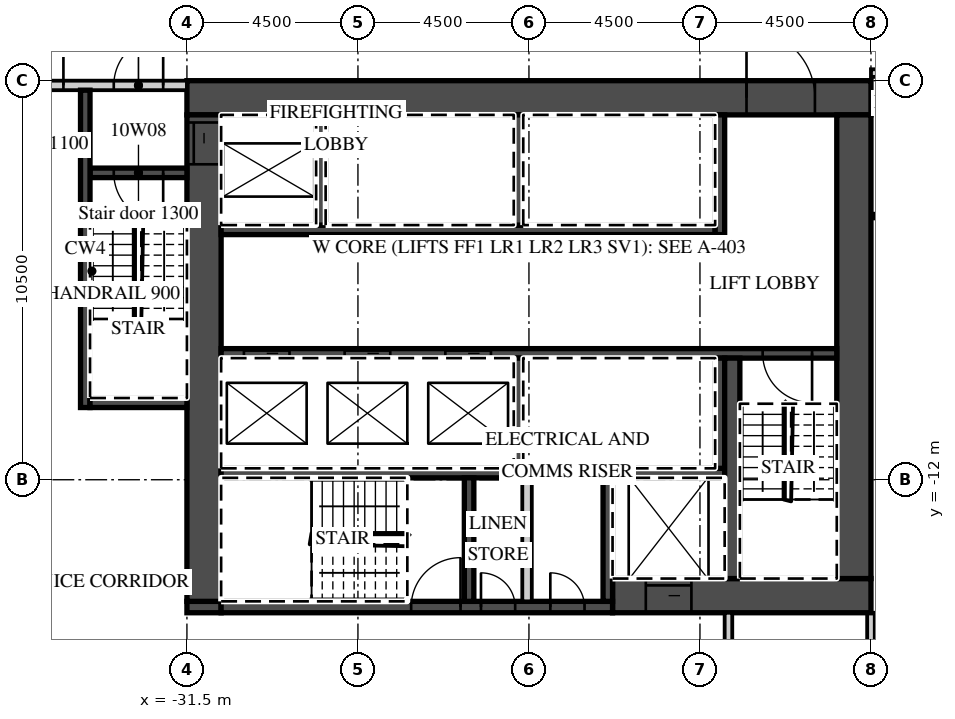
"""IFC4 building model, lengths in metres.
Left out: names, types, materials, properties, quantities, classifications, styles, units other than length and angle.
Written with IfcOpenShell. Run it as: python <this file> out.ifc"""

import sys

from ifc_helpers import new_model, si_unit, direction, frame, frame_2d, origin, place, context, subcontext, project, spatial, rectangle, extrude, element, fill, save


model = new_model("IFC4")
c1 = context("Model", 3, precision=1e-05, world=origin(), true_north=direction((0.0, 1.0)))
c2 = subcontext(c1, "Body", "Model", "MODEL_VIEW")
j1 = project(units=[si_unit("LENGTHUNIT", "METRE"), si_unit("PLANEANGLEUNIT", "RADIAN")], contexts=[c1])
p1 = place(None, origin())
s1 = spatial("IfcSite", under=j1, at=p1, CompositionType="ELEMENT")
p2 = place(p1, origin())
s2 = spatial("IfcBuilding", under=s1, at=p2, CompositionType="ELEMENT")
p3 = place(p2, frame((0.0, 0.0, 63.3)))
s3 = spatial("IfcBuildingStorey", under=s2, at=p3, CompositionType="ELEMENT", Elevation=63.3)
p4 = place(p3, frame((-13.5, -21.55, 0.0), z_axis=(0.0, 0.0, 1.0), x_axis=(0.0, 1.0, 0.0)))
e1 = element("IfcWall", 1, at=p4, inside=s3, PredefinedType="PARTITIONING", context=c2, shape_type="SweptSolid", body=[
    extrude(rectangle(XDim=6.05, YDim=0.2, at=frame_2d((3.025, 0.0))), origin(), (0.0, 0.0, 1.0), 3.02),
])
p5 = place(p3, frame((-13.5, -1.3, 0.0), z_axis=(0.0, 0.0, 1.0), x_axis=(1.0, 0.0, 0.0)))
e2 = element("IfcWall", 2, at=p5, inside=s3, PredefinedType="PARTITIONING", context=c2, shape_type="SweptSolid", body=[
    extrude(rectangle(XDim=58.05, YDim=0.2, at=frame_2d((29.025, 0.0))), origin(), (0.0, 0.0, 1.0), 3.02),
])
p6 = place(p5, frame((2.925, 0.0, 0.0)))
e3 = element("IfcOpeningElement", 3, at=p6, cuts=e2, PredefinedType="OPENING", context=c2, shape_type="SweptSolid", body=[
    extrude(rectangle(XDim=1.0, YDim=2.1, at=frame_2d((0.5, 1.05))), frame((0.0, 0.11, 0.0), z_axis=(0.0, -1.0, 0.0), x_axis=(1.0, 0.0, 0.0)), (0.0, 0.0, 1.0), 0.22),
])
p7 = place(p5, frame((9.863, 0.0, 0.0)))
e4 = element("IfcOpeningElement", 4, at=p7, cuts=e2, PredefinedType="OPENING", context=c2, shape_type="SweptSolid", body=[
    extrude(rectangle(XDim=1.2, YDim=2.1, at=frame_2d((0.6, 1.05))), frame((0.0, 0.11, 0.0), z_axis=(0.0, -1.0, 0.0), x_axis=(1.0, 0.0, 0.0)), (0.0, 0.0, 1.0), 0.22),
])
p8 = place(p5, frame((16.45, 0.0, 0.0)))
e5 = element("IfcOpeningElement", 5, at=p8, cuts=e2, PredefinedType="OPENING", context=c2, shape_type="SweptSolid", body=[
    extrude(rectangle(XDim=1.0, YDim=2.1, at=frame_2d((0.5, 1.05))), frame((0.0, 0.11, 0.0), z_axis=(0.0, -1.0, 0.0), x_axis=(1.0, 0.0, 0.0)), (0.0, 0.0, 1.0), 0.22),
])
p9 = place(p5, frame((18.55, 0.0, 0.0)))
e6 = element("IfcOpeningElement", 6, at=p9, cuts=e2, PredefinedType="OPENING", context=c2, shape_type="SweptSolid", body=[
    extrude(rectangle(XDim=1.0, YDim=2.1, at=frame_2d((0.5, 1.05))), frame((0.0, 0.11, 0.0), z_axis=(0.0, -1.0, 0.0), x_axis=(1.0, 0.0, 0.0)), (0.0, 0.0, 1.0), 0.22),
])
p10 = place(p5, frame((24.938, 0.0, 0.0)))
e7 = element("IfcOpeningElement", 7, at=p10, cuts=e2, PredefinedType="OPENING", context=c2, shape_type="SweptSolid", body=[
    extrude(rectangle(XDim=1.2, YDim=2.1, at=frame_2d((0.6, 1.05))), frame((0.0, 0.11, 0.0), z_axis=(0.0, -1.0, 0.0), x_axis=(1.0, 0.0, 0.0)), (0.0, 0.0, 1.0), 0.22),
])
p11 = place(p5, frame((33.938, 0.0, 0.0)))
e8 = element("IfcOpeningElement", 8, at=p11, cuts=e2, PredefinedType="OPENING", context=c2, shape_type="SweptSolid", body=[
    extrude(rectangle(XDim=1.2, YDim=2.1, at=frame_2d((0.6, 1.05))), frame((0.0, 0.11, 0.0), z_axis=(0.0, -1.0, 0.0), x_axis=(1.0, 0.0, 0.0)), (0.0, 0.0, 1.0), 0.22),
])
p12 = place(p5, frame((42.938, 0.0, 0.0)))
e9 = element("IfcOpeningElement", 9, at=p12, cuts=e2, PredefinedType="OPENING", context=c2, shape_type="SweptSolid", body=[
    extrude(rectangle(XDim=1.2, YDim=2.1, at=frame_2d((0.6, 1.05))), frame((0.0, 0.11, 0.0), z_axis=(0.0, -1.0, 0.0), x_axis=(1.0, 0.0, 0.0)), (0.0, 0.0, 1.0), 0.22),
])
p13 = place(p5, frame((52.425, 0.0, 0.0)))
e10 = element("IfcOpeningElement", 10, at=p13, cuts=e2, PredefinedType="OPENING", context=c2, shape_type="SweptSolid", body=[
    extrude(rectangle(XDim=1.0, YDim=2.1, at=frame_2d((0.5, 1.05))), frame((0.0, 0.11, 0.0), z_axis=(0.0, -1.0, 0.0), x_axis=(1.0, 0.0, 0.0)), (0.0, 0.0, 1.0), 0.22),
])
p14 = place(p5, frame((56.525, 0.0, 0.0)))
e11 = element("IfcOpeningElement", 11, at=p14, cuts=e2, PredefinedType="OPENING", context=c2, shape_type="SweptSolid", body=[
    extrude(rectangle(XDim=1.0, YDim=2.1, at=frame_2d((0.5, 1.05))), frame((0.0, 0.11, 0.0), z_axis=(0.0, -1.0, 0.0), x_axis=(1.0, 0.0, 0.0)), (0.0, 0.0, 1.0), 0.22),
])
p15 = place(p3, frame((-31.5, -1.95, 0.0), z_axis=(0.0, 0.0, 1.0), x_axis=(1.0, 0.0, 0.0)))
e12 = element("IfcWall", 12, at=p15, inside=s3, PredefinedType="SHEAR", context=c2, shape_type="SweptSolid", body=[
    extrude(rectangle(XDim=18.0, YDim=0.9, at=frame_2d((9.0, 0.0))), origin(), (0.0, 0.0, 1.0), 3.02),
])
p16 = place(p15, frame((14.725, 0.0, 0.0)))
e13 = element("IfcOpeningElement", 13, at=p16, cuts=e12, PredefinedType="OPENING", context=c2, shape_type="SweptSolid", body=[
    extrude(rectangle(XDim=1.8, YDim=2.1, at=frame_2d((0.9, 1.05))), frame((0.0, 0.46, 0.0), z_axis=(0.0, -1.0, 0.0), x_axis=(1.0, 0.0, 0.0)), (0.0, 0.0, 1.0), 0.92),
])
p17 = place(p3, frame((-20.3, -15.05, 0.0), z_axis=(0.0, 0.0, 1.0), x_axis=(1.0, 0.0, 0.0)))
e14 = element("IfcWall", 14, at=p17, inside=s3, PredefinedType="SHEAR", context=c2, shape_type="SweptSolid", body=[
    extrude(rectangle(XDim=6.8, YDim=0.9, at=frame_2d((3.4, 0.0))), origin(), (0.0, 0.0, 1.0), 3.02),
])
p18 = place(p17, frame((0.875, 0.0, 0.0)))
e15 = element("IfcOpeningElement", 15, at=p18, cuts=e14, PredefinedType="OPENING", context=c2, shape_type="SweptSolid", body=[
    extrude(rectangle(XDim=1.2, YDim=2.1, at=frame_2d((0.6, 1.05))), frame((0.0, 0.46, 0.0), z_axis=(0.0, -1.0, 0.0), x_axis=(1.0, 0.0, 0.0)), (0.0, 0.0, 1.0), 0.92),
])
p19 = place(p3, frame((-31.5, -15.35, 0.0), z_axis=(0.0, 0.0, 1.0), x_axis=(1.0, 0.0, 0.0)))
e16 = element("IfcWall", 16, at=p19, inside=s3, PredefinedType="SHEAR", context=c2, shape_type="SweptSolid", body=[
    extrude(rectangle(XDim=0.9, YDim=0.3, at=frame_2d((0.45, 0.0))), origin(), (0.0, 0.0, 1.0), 3.02),
])
p20 = place(p3, frame((-30.6, -15.35, 0.0), z_axis=(0.0, 0.0, 1.0), x_axis=(1.0, 0.0, 0.0)))
e17 = element("IfcWall", 17, at=p20, inside=s3, PredefinedType="SHEAR", context=c2, shape_type="SweptSolid", body=[
    extrude(rectangle(XDim=10.3, YDim=0.3, at=frame_2d((5.15, 0.0))), origin(), (0.0, 0.0, 1.0), 3.02),
])
p21 = place(p20, frame((5.0, 0.0, 0.0)))
e18 = element("IfcOpeningElement", 18, at=p21, cuts=e17, PredefinedType="OPENING", context=c2, shape_type="SweptSolid", body=[
    extrude(rectangle(XDim=1.3, YDim=2.1, at=frame_2d((0.65, 1.05))), frame((0.0, 0.16, 0.0), z_axis=(0.0, -1.0, 0.0), x_axis=(1.0, 0.0, 0.0)), (0.0, 0.0, 1.0), 0.32),
])
p22 = place(p20, frame((6.837, 0.0, 0.0)))
e19 = element("IfcOpeningElement", 19, at=p22, cuts=e17, PredefinedType="OPENING", context=c2, shape_type="SweptSolid", body=[
    extrude(rectangle(XDim=0.9, YDim=2.1, at=frame_2d((0.45, 1.05))), frame((0.0, 0.16, 0.0), z_axis=(0.0, -1.0, 0.0), x_axis=(1.0, 0.0, 0.0)), (0.0, 0.0, 1.0), 0.32),
])
p23 = place(p20, frame((8.663, 0.0, 0.0)))
e20 = element("IfcOpeningElement", 20, at=p23, cuts=e17, PredefinedType="OPENING", context=c2, shape_type="SweptSolid", body=[
    extrude(rectangle(XDim=0.9, YDim=2.1, at=frame_2d((0.45, 1.05))), frame((0.0, 0.16, 0.0), z_axis=(0.0, -1.0, 0.0), x_axis=(1.0, 0.0, 0.0)), (0.0, 0.0, 1.0), 0.32),
])
p24 = place(p3, frame((-31.05, -15.2, 0.0), z_axis=(0.0, 0.0, 1.0), x_axis=(0.0, 1.0, 0.0)))
e21 = element("IfcWall", 21, at=p24, inside=s3, PredefinedType="SHEAR", context=c2, shape_type="SweptSolid", body=[
    extrude(rectangle(XDim=12.8, YDim=0.9, at=frame_2d((6.4, 0.0))), origin(), (0.0, 0.0, 1.0), 3.02),
])
p25 = place(p24, frame((11.5, 0.0, 0.0)))
e22 = element("IfcOpeningElement", 22, at=p25, cuts=e21, PredefinedType="OPENING", context=c2, shape_type="SweptSolid", body=[
    extrude(rectangle(XDim=1.1, YDim=2.1, at=frame_2d((0.55, 1.05))), frame((0.0, 0.46, 0.0), z_axis=(0.0, -1.0, 0.0), x_axis=(1.0, 0.0, 0.0)), (0.0, 0.0, 1.0), 0.92),
])
p26 = place(p3, frame((-13.95, -14.6, 0.0), z_axis=(0.0, 0.0, 1.0), x_axis=(0.0, 1.0, 0.0)))
e23 = element("IfcWall", 23, at=p26, inside=s3, PredefinedType="SHEAR", context=c2, shape_type="SweptSolid", body=[
    extrude(rectangle(XDim=12.2, YDim=0.9, at=frame_2d((6.1, 0.0))), origin(), (0.0, 0.0, 1.0), 3.02),
])
p27 = place(p3, frame((-30.6, -5.425, 0.0), z_axis=(0.0, 0.0, 1.0), x_axis=(1.0, 0.0, 0.0)))
e24 = element("IfcWall", 24, at=p27, inside=s3, PredefinedType="SHEAR", context=c2, shape_type="SweptSolid", body=[
    extrude(rectangle(XDim=13.0, YDim=0.25, at=frame_2d((6.5, 0.0))), origin(), (0.0, 0.0, 1.0), 3.02),
])
p28 = place(p3, frame((-17.475, -5.55, 0.0), z_axis=(0.0, 0.0, 1.0), x_axis=(0.0, 1.0, 0.0)))
e25 = element("IfcWall", 25, at=p28, inside=s3, PredefinedType="SHEAR", context=c2, shape_type="SweptSolid", body=[
    extrude(rectangle(XDim=3.15, YDim=0.25, at=frame_2d((1.575, 0.0))), origin(), (0.0, 0.0, 1.0), 3.02),
])
for number, where, z_axis, x_axis in (
    (26, (-27.975, -5.3, 0.0), (0.0, 0.0, 1.0), (0.0, 1.0, 0.0)),
    (27, (-22.775, -5.3, 0.0), (0.0, 0.0, 1.0), (0.0, 1.0, 0.0)),
):
    element("IfcWall", number, at=place(p3, frame(where, z_axis=z_axis, x_axis=x_axis)), inside=s3, PredefinedType="SHEAR", context=c2, shape_type="SweptSolid", body=[
        extrude(rectangle(XDim=2.9, YDim=0.25, at=frame_2d((1.45, 0.0))), origin(), (0.0, 0.0, 1.0), 3.02),
    ])
p29 = place(p3, frame((-30.6, -8.675, 0.0), z_axis=(0.0, 0.0, 1.0), x_axis=(1.0, 0.0, 0.0)))
e28 = element("IfcWall", 28, at=p29, inside=s3, PredefinedType="SHEAR", context=c2, shape_type="SweptSolid", body=[
    extrude(rectangle(XDim=16.2, YDim=0.25, at=frame_2d((8.1, 0.0))), origin(), (0.0, 0.0, 1.0), 3.02),
])
p30 = place(p29, frame((0.6, 0.0, 0.0)))
e29 = element("IfcOpeningElement", 29, at=p30, cuts=e28, PredefinedType="OPENING", context=c2, shape_type="SweptSolid", body=[
    extrude(rectangle(XDim=1.2, YDim=2.1, at=frame_2d((0.6, 1.05))), frame((0.0, 0.135, 0.0), z_axis=(0.0, -1.0, 0.0), x_axis=(1.0, 0.0, 0.0)), (0.0, 0.0, 1.0), 0.27),
])
p31 = place(p29, frame((3.25, 0.0, 0.0)))
e30 = element("IfcOpeningElement", 30, at=p31, cuts=e28, PredefinedType="OPENING", context=c2, shape_type="SweptSolid", body=[
    extrude(rectangle(XDim=1.2, YDim=2.1, at=frame_2d((0.6, 1.05))), frame((0.0, 0.135, 0.0), z_axis=(0.0, -1.0, 0.0), x_axis=(1.0, 0.0, 0.0)), (0.0, 0.0, 1.0), 0.27),
])
p32 = place(p29, frame((5.9, 0.0, 0.0)))
e31 = element("IfcOpeningElement", 31, at=p32, cuts=e28, PredefinedType="OPENING", context=c2, shape_type="SweptSolid", body=[
    extrude(rectangle(XDim=1.2, YDim=2.1, at=frame_2d((0.6, 1.05))), frame((0.0, 0.135, 0.0), z_axis=(0.0, -1.0, 0.0), x_axis=(1.0, 0.0, 0.0)), (0.0, 0.0, 1.0), 0.27),
])
p33 = place(p29, frame((14.25, 0.0, 0.0)))
e32 = element("IfcOpeningElement", 32, at=p33, cuts=e28, PredefinedType="OPENING", context=c2, shape_type="SweptSolid", body=[
    extrude(rectangle(XDim=1.3, YDim=2.1, at=frame_2d((0.65, 1.05))), frame((0.0, 0.135, 0.0), z_axis=(0.0, -1.0, 0.0), x_axis=(1.0, 0.0, 0.0)), (0.0, 0.0, 1.0), 0.27),
])
p34 = place(p3, frame((-30.6, -11.825, 0.0), z_axis=(0.0, 0.0, 1.0), x_axis=(1.0, 0.0, 0.0)))
e33 = element("IfcWall", 33, at=p34, inside=s3, PredefinedType="SHEAR", context=c2, shape_type="SweptSolid", body=[
    extrude(rectangle(XDim=13.25, YDim=0.25, at=frame_2d((6.625, 0.0))), origin(), (0.0, 0.0, 1.0), 3.02),
])
for number, where, z_axis, x_axis in (
    (34, (-17.475, -11.7, 0.0), (0.0, 0.0, 1.0), (0.0, 1.0, 0.0)),
    (35, (-22.775, -11.7, 0.0), (0.0, 0.0, 1.0), (0.0, 1.0, 0.0)),
):
    element("IfcWall", number, at=place(p3, frame(where, z_axis=z_axis, x_axis=x_axis)), inside=s3, PredefinedType="SHEAR", context=c2, shape_type="SweptSolid", body=[
        extrude(rectangle(XDim=2.9, YDim=0.25, at=frame_2d((1.45, 0.0))), origin(), (0.0, 0.0, 1.0), 3.02),
    ])
p35 = place(p3, frame((-17.15, -14.6, 0.0), z_axis=(0.0, 0.0, 1.0), x_axis=(0.0, 1.0, 0.0)))
e36 = element("IfcWall", 36, at=p35, inside=s3, PredefinedType="SHEAR", context=c2, shape_type="SweptSolid", body=[
    extrude(rectangle(XDim=5.8, YDim=0.4, at=frame_2d((2.9, 0.0))), origin(), (0.0, 0.0, 1.0), 3.02),
])
for number, where, z_axis, x_axis in (
    (37, (-20.425, -15.2, 0.0), (0.0, 0.0, 1.0), (0.0, 1.0, 0.0)),
    (38, (-24.075, -15.2, 0.0), (0.0, 0.0, 1.0), (0.0, 1.0, 0.0)),
):
    element("IfcWall", number, at=place(p3, frame(where, z_axis=z_axis, x_axis=x_axis)), inside=s3, PredefinedType="SHEAR", context=c2, shape_type="SweptSolid", body=[
        extrude(rectangle(XDim=3.25, YDim=0.25, at=frame_2d((1.625, 0.0))), origin(), (0.0, 0.0, 1.0), 3.02),
    ])
p36 = place(p3, frame((-22.55, -15.2, 0.0), z_axis=(0.0, 0.0, 1.0), x_axis=(0.0, 1.0, 0.0)))
e39 = element("IfcWall", 39, at=p36, inside=s3, PredefinedType="PARTITIONING", context=c2, shape_type="SweptSolid", body=[
    extrude(rectangle(XDim=3.25, YDim=0.25, at=frame_2d((1.625, 0.0))), origin(), (0.0, 0.0, 1.0), 3.02),
])
p37 = place(p3, frame((-44.55, -1.625, 0.0), z_axis=(0.0, 0.0, 1.0), x_axis=(1.0, 0.0, 0.0)))
e40 = element("IfcWall", 40, at=p37, inside=s3, PredefinedType="PARTITIONING", context=c2, shape_type="SweptSolid", body=[
    extrude(rectangle(XDim=13.05, YDim=0.25, at=frame_2d((6.525, 0.0))), origin(), (0.0, 0.0, 1.0), 3.02),
])
p38 = place(p37, frame((11.125, 0.0, 0.0)))
e41 = element("IfcOpeningElement", 41, at=p38, cuts=e40, PredefinedType="OPENING", context=c2, shape_type="SweptSolid", body=[
    extrude(rectangle(XDim=1.3, YDim=2.1, at=frame_2d((0.65, 1.05))), frame((0.0, 0.135, 0.0), z_axis=(0.0, -1.0, 0.0), x_axis=(1.0, 0.0, 0.0)), (0.0, 0.0, 1.0), 0.27),
])
p39 = place(p37, frame((8.7, 0.0, 0.0)))
e42 = element("IfcOpeningElement", 42, at=p39, cuts=e40, PredefinedType="OPENING", context=c2, shape_type="SweptSolid", body=[
    extrude(rectangle(XDim=1.1, YDim=2.1, at=frame_2d((0.55, 1.05))), frame((0.0, 0.135, 0.0), z_axis=(0.0, -1.0, 0.0), x_axis=(1.0, 0.0, 0.0)), (0.0, 0.0, 1.0), 0.27),
])
p40 = place(p3, frame((-34.05, -3.925, 0.0), z_axis=(0.0, 0.0, 1.0), x_axis=(1.0, 0.0, 0.0)))
e43 = element("IfcWall", 43, at=p40, inside=s3, PredefinedType="SHEAR", context=c2, shape_type="SweptSolid", body=[
    extrude(rectangle(XDim=2.55, YDim=0.25, at=frame_2d((1.275, 0.0))), origin(), (0.0, 0.0, 1.0), 3.02),
])
p41 = place(p40, frame((0.625, 0.0, 0.0)))
e44 = element("IfcOpeningElement", 44, at=p41, cuts=e43, PredefinedType="OPENING", context=c2, shape_type="SweptSolid", body=[
    extrude(rectangle(XDim=1.3, YDim=2.1, at=frame_2d((0.65, 1.05))), frame((0.0, 0.135, 0.0), z_axis=(0.0, -1.0, 0.0), x_axis=(1.0, 0.0, 0.0)), (0.0, 0.0, 1.0), 0.27),
])
p42 = place(p3, frame((-34.175, -10.1, 0.0), z_axis=(0.0, 0.0, 1.0), x_axis=(0.0, 1.0, 0.0)))
e45 = element("IfcWall", 45, at=p42, inside=s3, PredefinedType="SHEAR", context=c2, shape_type="SweptSolid", body=[
    extrude(rectangle(XDim=8.35, YDim=0.25, at=frame_2d((4.175, 0.0))), origin(), (0.0, 0.0, 1.0), 3.02),
])
p43 = place(p3, frame((-34.05, -9.975, 0.0), z_axis=(0.0, 0.0, 1.0), x_axis=(1.0, 0.0, 0.0)))
e46 = element("IfcWall", 46, at=p43, inside=s3, PredefinedType="SHEAR", context=c2, shape_type="SweptSolid", body=[
    extrude(rectangle(XDim=2.55, YDim=0.25, at=frame_2d((1.275, 0.0))), origin(), (0.0, 0.0, 1.0), 3.02),
])
p44 = place(p3, frame((-17.25, -17.7, 0.0), z_axis=(0.0, 0.0, 1.0), x_axis=(0.0, 1.0, 0.0)))
e47 = element("IfcWall", 47, at=p44, inside=s3, PredefinedType="PARTITIONING", context=c2, shape_type="SweptSolid", body=[
    extrude(rectangle(XDim=2.2, YDim=0.2, at=frame_2d((1.1, 0.0))), origin(), (0.0, 0.0, 1.0), 3.02),
])
p45 = place(p30, origin())
e48 = element("IfcDoor", 48, at=p45, inside=s3, OperationType="SLIDING_TO_LEFT", PredefinedType="DOOR", context=c2, shape_type="SweptSolid", body=[
    extrude(rectangle(XDim=1.2, YDim=2.1, at=frame_2d((0.6, 1.05))), frame((0.0, 0.025, 0.0), z_axis=(0.0, -1.0, 0.0), x_axis=(1.0, 0.0, 0.0)), (0.0, 0.0, 1.0), 0.05),
])
fill(e29, e48)
p46 = place(p31, origin())
e49 = element("IfcDoor", 49, at=p46, inside=s3, OperationType="SLIDING_TO_RIGHT", PredefinedType="DOOR", context=c2, shape_type="SweptSolid", body=[
    extrude(rectangle(XDim=1.2, YDim=2.1, at=frame_2d((0.6, 1.05))), frame((0.0, 0.025, 0.0), z_axis=(0.0, -1.0, 0.0), x_axis=(1.0, 0.0, 0.0)), (0.0, 0.0, 1.0), 0.05),
])
fill(e30, e49)
p47 = place(p32, origin())
e50 = element("IfcDoor", 50, at=p47, inside=s3, OperationType="SLIDING_TO_RIGHT", PredefinedType="DOOR", context=c2, shape_type="SweptSolid", body=[
    extrude(rectangle(XDim=1.2, YDim=2.1, at=frame_2d((0.6, 1.05))), frame((0.0, 0.025, 0.0), z_axis=(0.0, -1.0, 0.0), x_axis=(1.0, 0.0, 0.0)), (0.0, 0.0, 1.0), 0.05),
])
fill(e31, e50)
p48 = place(p18, origin())
e51 = element("IfcDoor", 51, at=p48, inside=s3, OperationType="SLIDING_TO_LEFT", PredefinedType="DOOR", context=c2, shape_type="SweptSolid", body=[
    extrude(rectangle(XDim=1.2, YDim=2.1, at=frame_2d((0.6, 1.05))), frame((0.0, 0.025, 0.0), z_axis=(0.0, -1.0, 0.0), x_axis=(1.0, 0.0, 0.0)), (0.0, 0.0, 1.0), 0.05),
])
fill(e15, e51)
p49 = place(p25, origin())
e52 = element("IfcDoor", 52, at=p49, inside=s3, OperationType="SLIDING_TO_RIGHT", PredefinedType="DOOR", context=c2, shape_type="SweptSolid", body=[
    extrude(rectangle(XDim=1.1, YDim=2.1, at=frame_2d((0.55, 1.05))), frame((0.0, 0.025, 0.0), z_axis=(0.0, -1.0, 0.0), x_axis=(1.0, 0.0, 0.0)), (0.0, 0.0, 1.0), 0.05),
])
fill(e22, e52)
p50 = place(p16, origin())
e53 = element("IfcDoor", 53, at=p50, inside=s3, OperationType="DOUBLE_DOOR_DOUBLE_SWING", PredefinedType="DOOR", context=c2, shape_type="SweptSolid", body=[
    extrude(rectangle(XDim=1.8, YDim=2.1, at=frame_2d((0.9, 1.05))), frame((0.0, 0.025, 0.0), z_axis=(0.0, -1.0, 0.0), x_axis=(1.0, 0.0, 0.0)), (0.0, 0.0, 1.0), 0.05),
])
fill(e13, e53)
p51 = place(p38, origin())
e54 = element("IfcDoor", 54, at=p51, inside=s3, OperationType="SINGLE_SWING_RIGHT", PredefinedType="DOOR", context=c2, shape_type="SweptSolid", body=[
    extrude(rectangle(XDim=1.3, YDim=2.1, at=frame_2d((0.65, 1.05))), frame((0.0, 0.025, 0.0), z_axis=(0.0, -1.0, 0.0), x_axis=(1.0, 0.0, 0.0)), (0.0, 0.0, 1.0), 0.05),
])
fill(e41, e54)
p52 = place(p41, origin())
e55 = element("IfcDoor", 55, at=p52, inside=s3, OperationType="SINGLE_SWING_RIGHT", PredefinedType="DOOR", context=c2, shape_type="SweptSolid", body=[
    extrude(rectangle(XDim=1.3, YDim=2.1, at=frame_2d((0.65, 1.05))), frame((0.0, 0.025, 0.0), z_axis=(0.0, -1.0, 0.0), x_axis=(1.0, 0.0, 0.0)), (0.0, 0.0, 1.0), 0.05),
])
fill(e44, e55)
p53 = place(p39, origin())
e56 = element("IfcDoor", 56, at=p53, inside=s3, OperationType="SINGLE_SWING_RIGHT", PredefinedType="DOOR", context=c2, shape_type="SweptSolid", body=[
    extrude(rectangle(XDim=1.1, YDim=2.1, at=frame_2d((0.55, 1.05))), frame((0.0, 0.025, 0.0), z_axis=(0.0, -1.0, 0.0), x_axis=(1.0, 0.0, 0.0)), (0.0, 0.0, 1.0), 0.05),
])
fill(e42, e56)
p54 = place(p33, origin())
e57 = element("IfcDoor", 57, at=p54, inside=s3, OperationType="SINGLE_SWING_RIGHT", PredefinedType="DOOR", context=c2, shape_type="SweptSolid", body=[
    extrude(rectangle(XDim=1.3, YDim=2.1, at=frame_2d((0.65, 1.05))), frame((0.0, 0.025, 0.0), z_axis=(0.0, -1.0, 0.0), x_axis=(1.0, 0.0, 0.0)), (0.0, 0.0, 1.0), 0.05),
])
fill(e32, e57)
p55 = place(p21, origin())
e58 = element("IfcDoor", 58, at=p55, inside=s3, OperationType="SINGLE_SWING_RIGHT", PredefinedType="DOOR", context=c2, shape_type="SweptSolid", body=[
    extrude(rectangle(XDim=1.3, YDim=2.1, at=frame_2d((0.65, 1.05))), frame((0.0, 0.025, 0.0), z_axis=(0.0, -1.0, 0.0), x_axis=(1.0, 0.0, 0.0)), (0.0, 0.0, 1.0), 0.05),
])
fill(e18, e58)
p56 = place(p22, origin())
e59 = element("IfcDoor", 59, at=p56, inside=s3, OperationType="SINGLE_SWING_LEFT", PredefinedType="DOOR", context=c2, shape_type="SweptSolid", body=[
    extrude(rectangle(XDim=0.9, YDim=2.1, at=frame_2d((0.45, 1.05))), frame((0.0, 0.025, 0.0), z_axis=(0.0, -1.0, 0.0), x_axis=(1.0, 0.0, 0.0)), (0.0, 0.0, 1.0), 0.05),
])
fill(e19, e59)
p57 = place(p23, origin())
e60 = element("IfcDoor", 60, at=p57, inside=s3, OperationType="SINGLE_SWING_LEFT", PredefinedType="DOOR", context=c2, shape_type="SweptSolid", body=[
    extrude(rectangle(XDim=0.9, YDim=2.1, at=frame_2d((0.45, 1.05))), frame((0.0, 0.025, 0.0), z_axis=(0.0, -1.0, 0.0), x_axis=(1.0, 0.0, 0.0)), (0.0, 0.0, 1.0), 0.05),
])
fill(e20, e60)
save(model, sys.argv[1])
